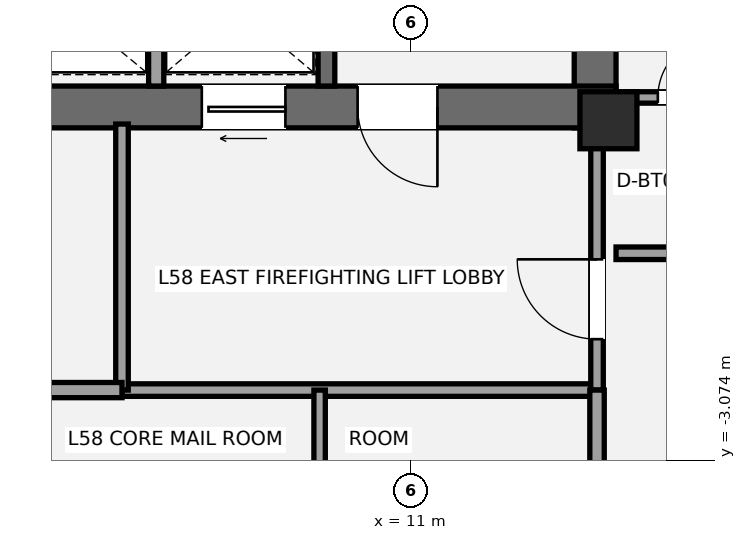
"""IFC4 building model, lengths in metres.
Left out: names, types, materials, properties, quantities, classifications, styles, units other than length and angle.
Written with IfcOpenShell. Run it as: python <this file> out.ifc"""

import sys

from ifc_helpers import new_model, si_unit, direction, frame, frame_2d, origin, origin_2d, place, context, subcontext, project, spatial, rectangle, extrude, element, fill, save


model = new_model("IFC4")
c1 = context("Model", 3, precision=1e-05, world=origin(), true_north=direction((0.0, 1.0)))
c2 = subcontext(c1, "Body", "Model", "MODEL_VIEW")
j1 = project(units=[si_unit("LENGTHUNIT", "METRE"), si_unit("PLANEANGLEUNIT", "RADIAN")], contexts=[c1])
p1 = place(None, origin())
s1 = spatial("IfcSite", under=j1, at=p1, CompositionType="ELEMENT")
p2 = place(p1, origin())
s2 = spatial("IfcBuilding", under=s1, at=p2, CompositionType="ELEMENT")
p3 = place(p2, frame((0.0, 0.0, 210.0)))
s3 = spatial("IfcBuildingStorey", under=s2, at=p3, CompositionType="ELEMENT", Elevation=210.0)
p4 = place(p3, frame((13.425, 1.3, 0.0), z_axis=(0.0, 0.0, 1.0), x_axis=(0.0, 1.0, 0.0)))
e1 = element("IfcWall", 1, at=p4, inside=s3, PredefinedType="SHEAR", context=c2, shape_type="SweptSolid", body=[
    extrude(rectangle(XDim=8.25, YDim=0.55, at=frame_2d((4.125, 0.0))), origin(), (0.0, 0.0, 1.0), 3.15),
])
p5 = place(p3, frame((13.7, 1.575, 0.0), z_axis=(0.0, 0.0, 1.0), x_axis=(-1.0, 0.0, 0.0)))
e2 = element("IfcWall", 2, at=p5, inside=s3, PredefinedType="SHEAR", context=c2, shape_type="SweptSolid", body=[
    extrude(rectangle(XDim=8.775, YDim=0.55, at=frame_2d((4.387, 0.0))), origin(), (0.0, 0.0, 1.0), 3.15),
])
p6 = place(p5, frame((2.35, 0.0, 0.0)))
e3 = element("IfcOpeningElement", 3, at=p6, cuts=e2, PredefinedType="OPENING", context=c2, shape_type="SweptSolid", body=[
    extrude(rectangle(XDim=1.05, YDim=2.15, at=frame_2d((0.525, 1.075))), frame((0.0, 0.285, 0.0), z_axis=(0.0, -1.0, 0.0), x_axis=(1.0, 0.0, 0.0)), (0.0, 0.0, 1.0), 0.57),
])
p7 = place(p5, frame((4.35, 0.0, 0.0)))
e4 = element("IfcOpeningElement", 4, at=p7, cuts=e2, PredefinedType="OPENING", context=c2, shape_type="SweptSolid", body=[
    extrude(rectangle(XDim=1.1, YDim=2.2, at=frame_2d((0.55, 1.1))), frame((0.0, 0.285, 0.0), z_axis=(0.0, -1.0, 0.0), x_axis=(1.0, 0.0, 0.0)), (0.0, 0.0, 1.0), 0.57),
])
p8 = place(p3, frame((9.89, 1.85, 0.0), z_axis=(0.0, 0.0, 1.0), x_axis=(0.0, 1.0, 0.0)))
e5 = element("IfcWall", 5, at=p8, inside=s3, PredefinedType="SHEAR", context=c2, shape_type="SweptSolid", body=[
    extrude(rectangle(XDim=7.15, YDim=0.22, at=frame_2d((3.575, 0.0))), origin(), (0.0, 0.0, 1.0), 3.15),
])
p9 = place(p3, frame((13.6, 1.4, 0.0), z_axis=(0.0, 0.0, 1.0), x_axis=(1.0, 0.0, 0.0)))
e6 = element("IfcColumn", 6, at=p9, inside=s3, PredefinedType="PILASTER", context=c2, shape_type="SweptSolid", body=[
    extrude(rectangle(XDim=0.75, YDim=0.75, at=origin_2d()), origin(), (0.0, 0.0, 1.0), 3.15),
])
p10 = place(p3, frame((7.2, -2.15, 0.0), z_axis=(0.0, 0.0, 1.0), x_axis=(1.0, 0.0, 0.0)))
e7 = element("IfcWall", 7, at=p10, inside=s3, PredefinedType="PARTITIONING", context=c2, shape_type="SweptSolid", body=[
    extrude(rectangle(XDim=6.25, YDim=0.165, at=frame_2d((3.125, 0.0))), origin(), (0.0, 0.0, 1.0), 2.97),
])
p11 = place(p3, frame((7.2, -2.15, 0.0), z_axis=(0.0, 0.0, 1.0), x_axis=(0.0, 1.0, 0.0)))
e8 = element("IfcWall", 8, at=p11, inside=s3, PredefinedType="PARTITIONING", context=c2, shape_type="SweptSolid", body=[
    extrude(rectangle(XDim=3.5, YDim=0.165, at=frame_2d((1.75, 0.0))), origin(), (0.0, 0.0, 1.0), 2.423),
])
p12 = place(p3, frame((13.45, -2.15, 0.0), z_axis=(0.0, 0.0, 1.0), x_axis=(0.0, 1.0, 0.0)))
e9 = element("IfcWall", 9, at=p12, inside=s3, PredefinedType="PARTITIONING", context=c2, shape_type="SweptSolid", body=[
    extrude(rectangle(XDim=3.5, YDim=0.165, at=frame_2d((1.75, 0.0))), origin(), (0.0, 0.0, 1.0), 2.423),
])
p13 = place(p12, frame((0.67, 0.0, 0.0)))
e10 = element("IfcOpeningElement", 10, at=p13, cuts=e9, PredefinedType="OPENING", context=c2, shape_type="SweptSolid", body=[
    extrude(rectangle(XDim=1.05, YDim=2.15, at=frame_2d((0.525, 1.075))), frame((0.0, 0.093, 0.0), z_axis=(0.0, -1.0, 0.0), x_axis=(1.0, 0.0, 0.0)), (0.0, 0.0, 1.0), 0.185),
])
p14 = place(p3, frame((4.95, -2.15, 0.0), z_axis=(0.0, 0.0, 1.0), x_axis=(1.0, 0.0, 0.0)))
e11 = element("IfcWall", 11, at=p14, inside=s3, PredefinedType="SOLIDWALL", context=c2, shape_type="SweptSolid", body=[
    extrude(rectangle(XDim=2.25, YDim=0.2, at=frame_2d((1.125, 0.0))), origin(), (0.0, 0.0, 1.0), 2.97),
])
p15 = place(p3, frame((7.65, 1.85, 0.0), z_axis=(0.0, 0.0, 1.0), x_axis=(0.0, 1.0, 0.0)))
e12 = element("IfcWall", 12, at=p15, inside=s3, PredefinedType="SOLIDWALL", context=c2, shape_type="SweptSolid", body=[
    extrude(rectangle(XDim=1.97, YDim=0.2, at=frame_2d((0.985, 0.0))), origin(), (0.0, 0.0, 1.0), 2.97),
])
p16 = place(p3, frame((13.45, -4.05, 0.0), z_axis=(0.0, 0.0, 1.0), x_axis=(0.0, 1.0, 0.0)))
e13 = element("IfcWall", 13, at=p16, inside=s3, PredefinedType="PLUMBINGWALL", context=c2, shape_type="SweptSolid", body=[
    extrude(rectangle(XDim=1.9, YDim=0.19, at=frame_2d((0.95, 0.0))), origin(), (0.0, 0.0, 1.0), 2.423),
])
p17 = place(p3, frame((9.8, -4.05, 0.0), z_axis=(0.0, 0.0, 1.0), x_axis=(0.0, 1.0, 0.0)))
e14 = element("IfcWall", 14, at=p17, inside=s3, PredefinedType="PLUMBINGWALL", context=c2, shape_type="SweptSolid", body=[
    extrude(rectangle(XDim=1.9, YDim=0.15, at=frame_2d((0.95, 0.0))), origin(), (0.0, 0.0, 1.0), 2.97),
])
p18 = place(p3, frame((13.7, -0.35, 0.0), z_axis=(0.0, 0.0, 1.0), x_axis=(1.0, 0.0, 0.0)))
e15 = element("IfcWall", 15, at=p18, inside=s3, PredefinedType="PARTITIONING", context=c2, shape_type="SweptSolid", body=[
    extrude(rectangle(XDim=1.85, YDim=0.165, at=frame_2d((0.925, 0.0))), origin(), (0.0, 0.0, 1.0), 2.423),
])
p19 = place(p3, frame((13.7, 1.7, 0.0), z_axis=(0.0, 0.0, 1.0), x_axis=(1.0, 0.0, 0.0)))
e16 = element("IfcWall", 16, at=p19, inside=s3, PredefinedType="PLUMBINGWALL", context=c2, shape_type="SweptSolid", body=[
    extrude(rectangle(XDim=4.25, YDim=0.15, at=frame_2d((2.125, 0.0))), origin(), (0.0, 0.0, 1.0), 2.423),
])
p20 = place(p19, frame((0.55, 0.0, 0.0)))
e17 = element("IfcOpeningElement", 17, at=p20, cuts=e16, PredefinedType="OPENING", context=c2, shape_type="SweptSolid", body=[
    extrude(rectangle(XDim=0.8, YDim=2.1, at=frame_2d((0.4, 1.05))), frame((0.0, 0.085, 0.0), z_axis=(0.0, -1.0, 0.0), x_axis=(1.0, 0.0, 0.0)), (0.0, 0.0, 1.0), 0.17),
])
p21 = place(p19, frame((2.15, 0.0, 0.0)))
e18 = element("IfcOpeningElement", 18, at=p21, cuts=e16, PredefinedType="OPENING", context=c2, shape_type="SweptSolid", body=[
    extrude(rectangle(XDim=0.85, YDim=2.1, at=frame_2d((0.425, 1.05))), frame((0.0, 0.085, 0.0), z_axis=(0.0, -1.0, 0.0), x_axis=(1.0, 0.0, 0.0)), (0.0, 0.0, 1.0), 0.17),
])
p22 = place(p6, origin())
e19 = element("IfcDoor", 19, at=p22, inside=s3, OperationType="SINGLE_SWING_LEFT", PredefinedType="DOOR", context=c2, shape_type="SweptSolid", body=[
    extrude(rectangle(XDim=1.05, YDim=2.15, at=frame_2d((0.525, 1.075))), frame((0.0, 0.025, 0.0), z_axis=(0.0, -1.0, 0.0), x_axis=(1.0, 0.0, 0.0)), (0.0, 0.0, 1.0), 0.05),
])
fill(e3, e19)
p23 = place(p13, origin())
e20 = element("IfcDoor", 20, at=p23, inside=s3, OperationType="SINGLE_SWING_RIGHT", PredefinedType="DOOR", context=c2, shape_type="SweptSolid", body=[
    extrude(rectangle(XDim=1.05, YDim=2.15, at=frame_2d((0.525, 1.075))), frame((0.0, 0.025, 0.0), z_axis=(0.0, -1.0, 0.0), x_axis=(1.0, 0.0, 0.0)), (0.0, 0.0, 1.0), 0.05),
])
fill(e10, e20)
p24 = place(p7, origin())
e21 = element("IfcDoor", 21, at=p24, inside=s3, OperationType="SLIDING_TO_LEFT", PredefinedType="DOOR", context=c2, shape_type="SweptSolid", body=[
    extrude(rectangle(XDim=1.1, YDim=2.2, at=frame_2d((0.55, 1.1))), frame((0.0, 0.025, 0.0), z_axis=(0.0, -1.0, 0.0), x_axis=(1.0, 0.0, 0.0)), (0.0, 0.0, 1.0), 0.05),
])
fill(e4, e21)
p25 = place(p20, origin())
e22 = element("IfcDoor", 22, at=p25, inside=s3, OperationType="SINGLE_SWING_RIGHT", PredefinedType="DOOR", context=c2, shape_type="SweptSolid", body=[
    extrude(rectangle(XDim=0.8, YDim=2.1, at=frame_2d((0.4, 1.05))), frame((0.0, 0.025, 0.0), z_axis=(0.0, -1.0, 0.0), x_axis=(1.0, 0.0, 0.0)), (0.0, 0.0, 1.0), 0.05),
])
fill(e17, e22)
save(model, sys.argv[1])
